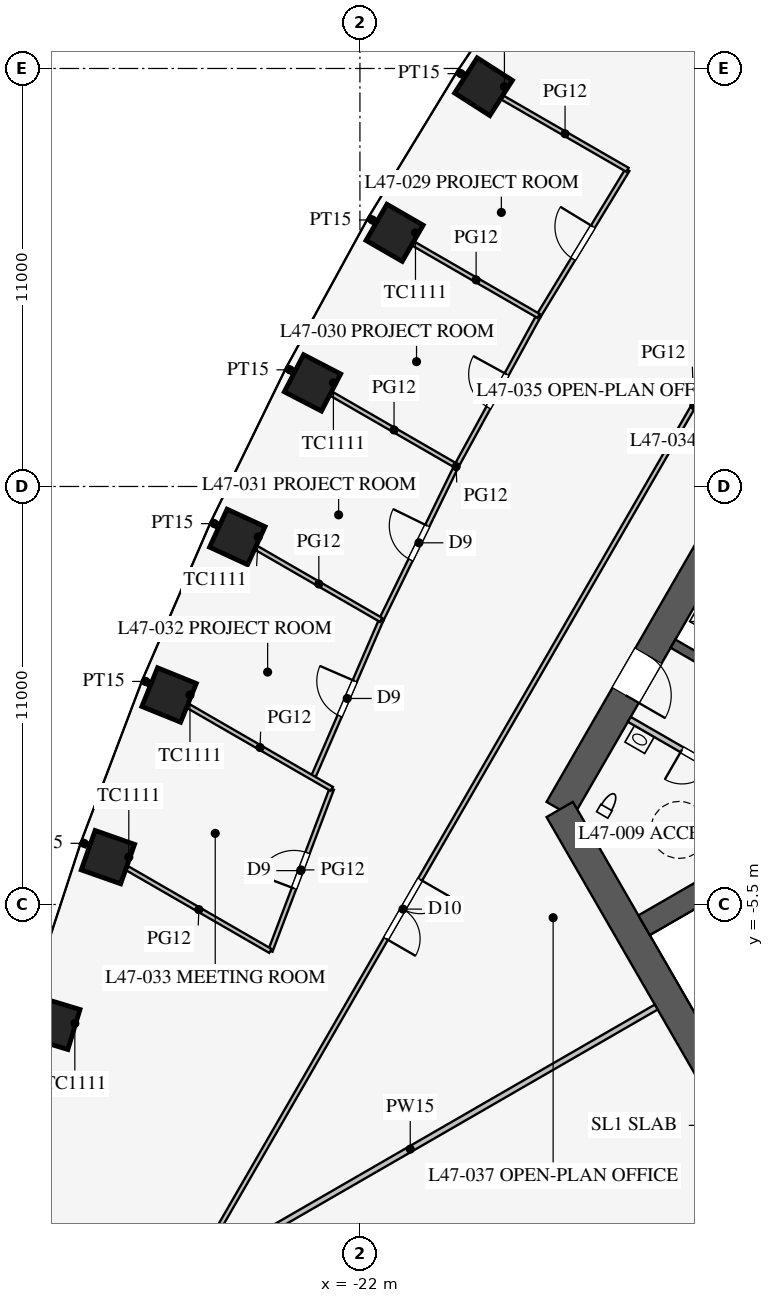
"""IFC4 building model, lengths in metres.
Left out: names, types, materials, properties, quantities, classifications, styles, units other than length and angle.
Written with IfcOpenShell. Run it as: python <this file> out.ifc"""

import sys

from ifc_helpers import new_model, si_unit, direction, frame, frame_2d, origin, origin_2d, place, context, subcontext, project, spatial, rectangle, extrude, element, fill, save


model = new_model("IFC4")
c1 = context("Model", 3, precision=1e-05, world=origin(), true_north=direction((0.0, 1.0)))
c2 = subcontext(c1, "Body", "Model", "MODEL_VIEW")
j1 = project(units=[si_unit("LENGTHUNIT", "METRE"), si_unit("PLANEANGLEUNIT", "RADIAN")], contexts=[c1])
p1 = place(None, origin())
s1 = spatial("IfcSite", under=j1, at=p1, CompositionType="ELEMENT")
p2 = place(p1, origin())
s2 = spatial("IfcBuilding", under=s1, at=p2, CompositionType="ELEMENT")
p3 = place(p2, frame((0.0, 0.0, 206.5)))
s3 = spatial("IfcBuildingStorey", under=s2, at=p3, CompositionType="ELEMENT", Elevation=206.5)
for number, where, z_axis, x_axis in (
    (1, (-18.748, 16.02, 0.0), (0.0, 0.0, 1.0), (-0.539, -0.842, 0.0)),
    (2, (-21.088, 12.175, 0.0), (0.0, 0.0, 1.0), (-0.5, -0.866, 0.0)),
    (3, (-23.248, 8.226, 0.0), (0.0, 0.0, 1.0), (-0.46, -0.888, 0.0)),
    (4, (-25.227, 4.172, 0.0), (0.0, 0.0, 1.0), (-0.418, -0.908, 0.0)),
    (5, (-27.022, 0.013, 0.0), (0.0, 0.0, 1.0), (-0.376, -0.927, 0.0)),
    (6, (-28.632, -4.254, 0.0), (0.0, 0.0, 1.0), (-0.332, -0.943, 0.0)),
    (7, (-30.052, -8.63, 0.0), (0.0, 0.0, 1.0), (-0.29, -0.957, 0.0)),
):
    element("IfcColumn", number, at=place(p3, frame(where, z_axis=z_axis, x_axis=x_axis)), inside=s3, PredefinedType="COLUMN", context=c2, shape_type="SweptSolid", body=[
        extrude(rectangle(XDim=1.1, YDim=1.1, at=origin_2d()), origin(), (0.0, 0.0, 1.0), 4.2),
    ])
p4 = place(p3, frame((-5.773, 16.0, 0.0), z_axis=(0.0, 0.0, 1.0), x_axis=(-0.500002442456, -0.866023993627, 0.0)))
e8 = element("IfcWall", 8, at=p4, inside=s3, PredefinedType="SHEAR", context=c2, shape_type="SweptSolid", body=[
    extrude(rectangle(XDim=21.939, YDim=0.8, at=frame_2d((10.97, 0.0))), origin(), (0.0, 0.0, 1.0), 4.2),
])
p5 = place(p4, frame((17.27, 0.0, 0.0)))
e9 = element("IfcOpeningElement", 9, at=p5, cuts=e8, PredefinedType="OPENING", context=c2, shape_type="SweptSolid", body=[
    extrude(rectangle(XDim=1.2, YDim=2.1, at=frame_2d((0.6, 1.05))), frame((0.0, 0.41, 0.0), z_axis=(0.0, -1.0, 0.0), x_axis=(1.0, 0.0, 0.0)), (0.0, 0.0, 1.0), 0.82),
])
p6 = place(p4, frame((3.47, 0.0, 0.0)))
e10 = element("IfcOpeningElement", 10, at=p6, cuts=e8, PredefinedType="OPENING", context=c2, shape_type="SweptSolid", body=[
    extrude(rectangle(XDim=1.2, YDim=2.1, at=frame_2d((0.6, 1.05))), frame((0.0, 0.41, 0.0), z_axis=(0.0, -1.0, 0.0), x_axis=(1.0, 0.0, 0.0)), (0.0, 0.0, 1.0), 0.82),
])
p7 = place(p3, frame((-16.743, -3.0, 0.0), z_axis=(0.0, 0.0, 1.0), x_axis=(0.499995765644, -0.866027848477, 0.0)))
e11 = element("IfcWall", 11, at=p7, inside=s3, PredefinedType="SHEAR", context=c2, shape_type="SweptSolid", body=[
    extrude(rectangle(XDim=11.547, YDim=0.8, at=frame_2d((5.773, 0.0))), origin(), (0.0, 0.0, 1.0), 4.2),
])
p8 = place(p3, frame((-11.532, 0.076, 0.0), z_axis=(0.0, 0.0, 1.0), x_axis=(-0.866005588531, 0.500034319456, 0.0)))
e12 = element("IfcWall", 12, at=p8, inside=s3, PredefinedType="SHEAR", context=c2, shape_type="SweptSolid", body=[
    extrude(rectangle(XDim=2.575, YDim=0.25, at=frame_2d((1.288, 0.0))), origin(), (0.0, 0.0, 1.0), 4.2),
])
p9 = place(p3, frame((-6.663, -1.509, 0.0), z_axis=(0.0, 0.0, 1.0), x_axis=(-0.866019375473, -0.500010441196, 0.0)))
e13 = element("IfcWall", 13, at=p9, inside=s3, PredefinedType="SHEAR", context=c2, shape_type="SweptSolid", body=[
    extrude(rectangle(XDim=9.075, YDim=0.6, at=frame_2d((4.538, 0.0))), origin(), (0.0, 0.0, 1.0), 4.2),
])
p10 = place(p3, frame((-10.495, -3.178, 0.0), z_axis=(0.0, 0.0, 1.0), x_axis=(-0.86602216432, 0.500005610874, 0.0)))
e14 = element("IfcWall", 14, at=p10, inside=s3, PredefinedType="PARTITIONING", context=c2, shape_type="SweptSolid", body=[
    extrude(rectangle(XDim=5.1, YDim=0.15, at=frame_2d((2.55, 0.0))), origin(), (0.0, 0.0, 1.0), 4.0),
])
p11 = place(p10, frame((2.6, 0.0, 0.0)))
e15 = element("IfcOpeningElement", 15, at=p11, cuts=e14, PredefinedType="OPENING", context=c2, shape_type="SweptSolid", body=[
    extrude(rectangle(XDim=0.9, YDim=2.1, at=frame_2d((0.45, 1.05))), frame((0.0, 0.085, 0.0), z_axis=(0.0, -1.0, 0.0), x_axis=(1.0, 0.0, 0.0)), (0.0, 0.0, 1.0), 0.17),
])
p12 = place(p3, frame((-14.203, -8.2, 0.0), z_axis=(0.0, 0.0, 1.0), x_axis=(-0.866021600284, -0.500006587798, 0.0)))
e16 = element("IfcWall", 16, at=p12, inside=s3, PredefinedType="PARTITIONING", context=c2, shape_type="SweptSolid", body=[
    extrude(rectangle(XDim=14.95, YDim=0.15, at=frame_2d((7.475, 0.0))), origin(), (0.0, 0.0, 1.0), 2.4),
])
p13 = place(p3, frame((-0.016, 30.491, 0.0), z_axis=(0.0, 0.0, 1.0), x_axis=(-0.50000091641, -0.866024874695, 0.0)))
e17 = element("IfcWall", 17, at=p13, inside=s3, PredefinedType="PARTITIONING", context=c2, shape_type="SweptSolid", body=[
    extrude(rectangle(XDim=52.796, YDim=0.12, at=frame_2d((26.398, 0.0))), origin(), (0.0, 0.0, 1.0), 2.9),
])
p14 = place(p13, frame((10.2, 0.0, 0.15)))
e18 = element("IfcOpeningElement", 18, at=p14, cuts=e17, PredefinedType="OPENING", context=c2, shape_type="SweptSolid", body=[
    extrude(rectangle(XDim=1.8, YDim=2.1, at=frame_2d((0.9, 1.05))), frame((0.0, 0.07, 0.0), z_axis=(0.0, -1.0, 0.0), x_axis=(1.0, 0.0, 0.0)), (0.0, 0.0, 1.0), 0.14),
])
p15 = place(p13, frame((40.8, 0.0, 0.15)))
e19 = element("IfcOpeningElement", 19, at=p15, cuts=e17, PredefinedType="OPENING", context=c2, shape_type="SweptSolid", body=[
    extrude(rectangle(XDim=1.8, YDim=2.1, at=frame_2d((0.9, 1.05))), frame((0.0, 0.07, 0.0), z_axis=(0.0, -1.0, 0.0), x_axis=(1.0, 0.0, 0.0)), (0.0, 0.0, 1.0), 0.14),
])
p16 = place(p3, frame((-21.568, 12.452, 0.0), z_axis=(0.0, 0.0, 1.0), x_axis=(-0.866303639744, 0.499517771221, 0.0)))
e20 = element("IfcWall", 20, at=p16, inside=s3, PredefinedType="PARTITIONING", context=c2, shape_type="SweptSolid", body=[
    extrude(rectangle(XDim=0.241, YDim=0.15, at=frame_2d((0.121, 0.0))), origin(), (0.0, 0.0, 1.0), 2.9),
])
p17 = place(p3, frame((-27.563, 0.325, 0.0), z_axis=(0.0, 0.0, 1.0), x_axis=(-0.865614066289, 0.500711781609, 0.0)))
e21 = element("IfcWall", 21, at=p17, inside=s3, PredefinedType="PARTITIONING", context=c2, shape_type="SweptSolid", body=[
    extrude(rectangle(XDim=0.178, YDim=0.15, at=frame_2d((0.089, 0.0))), origin(), (0.0, 0.0, 1.0), 2.9),
])
p18 = place(p3, frame((-29.191, -3.931, 0.0), z_axis=(0.0, 0.0, 1.0), x_axis=(-0.866484919499, 0.499203249469, 0.0)))
e22 = element("IfcWall", 22, at=p18, inside=s3, PredefinedType="PARTITIONING", context=c2, shape_type="SweptSolid", body=[
    extrude(rectangle(XDim=0.163, YDim=0.15, at=frame_2d((0.082, 0.0))), origin(), (0.0, 0.0, 1.0), 2.9),
])
p19 = place(p3, frame((-23.749, 8.515, 0.0), z_axis=(0.0, 0.0, 1.0), x_axis=(-0.865810949009, 0.500371262739, 0.0)))
e23 = element("IfcWall", 23, at=p19, inside=s3, PredefinedType="PARTITIONING", context=c2, shape_type="SweptSolid", body=[
    extrude(rectangle(XDim=0.217, YDim=0.15, at=frame_2d((0.108, 0.0))), origin(), (0.0, 0.0, 1.0), 2.9),
])
p20 = place(p3, frame((-25.748, 4.473, 0.0), z_axis=(0.0, 0.0, 1.0), x_axis=(-0.865625187776, 0.500692554656, 0.0)))
e24 = element("IfcWall", 24, at=p20, inside=s3, PredefinedType="PARTITIONING", context=c2, shape_type="SweptSolid", body=[
    extrude(rectangle(XDim=0.196, YDim=0.15, at=frame_2d((0.098, 0.0))), origin(), (0.0, 0.0, 1.0), 2.9),
])
p21 = place(p3, frame((-19.249, 16.31, 0.0), z_axis=(0.0, 0.0, 1.0), x_axis=(-0.865810949009, 0.500371262739, 0.0)))
e25 = element("IfcWall", 25, at=p21, inside=s3, PredefinedType="PARTITIONING", context=c2, shape_type="SweptSolid", body=[
    extrude(rectangle(XDim=0.217, YDim=0.15, at=frame_2d((0.108, 0.0))), origin(), (0.0, 0.0, 1.0), 2.9),
])
p22 = place(p3, frame((-17.299, 9.988, 0.0), z_axis=(0.0, 0.0, 1.0), x_axis=(-0.480014565702, -0.877260518155, 0.0)))
e26 = element("IfcWall", 26, at=p22, inside=s3, PredefinedType="PARTITIONING", context=c2, shape_type="SweptSolid", body=[
    extrude(rectangle(XDim=4.501, YDim=0.12, at=frame_2d((2.25, 0.0))), origin(), (0.0, 0.0, 1.0), 2.9),
])
p23 = place(p22, frame((1.75, 0.0, 0.15)))
e27 = element("IfcOpeningElement", 27, at=p23, cuts=e26, PredefinedType="OPENING", context=c2, shape_type="SweptSolid", body=[
    extrude(rectangle(XDim=1.0, YDim=2.1, at=frame_2d((0.5, 1.05))), frame((0.0, 0.07, 0.0), z_axis=(0.0, -1.0, 0.0), x_axis=(1.0, 0.0, 0.0)), (0.0, 0.0, 1.0), 0.14),
])
p24 = place(p3, frame((-22.742, -2.458, 0.0), z_axis=(0.0, 0.0, 1.0), x_axis=(-0.354219967303, -0.935162132875, 0.0)))
e28 = element("IfcWall", 28, at=p24, inside=s3, PredefinedType="PARTITIONING", context=c2, shape_type="SweptSolid", body=[
    extrude(rectangle(XDim=4.559, YDim=0.12, at=frame_2d((2.28, 0.0))), origin(), (0.0, 0.0, 1.0), 2.9),
])
p25 = place(p24, frame((1.8, 0.0, 0.15)))
e29 = element("IfcOpeningElement", 29, at=p25, cuts=e28, PredefinedType="OPENING", context=c2, shape_type="SweptSolid", body=[
    extrude(rectangle(XDim=1.0, YDim=2.1, at=frame_2d((0.5, 1.05))), frame((0.0, 0.07, 0.0), z_axis=(0.0, -1.0, 0.0), x_axis=(1.0, 0.0, 0.0)), (0.0, 0.0, 1.0), 0.14),
])
p26 = place(p3, frame((-19.46, 6.039, 0.0), z_axis=(0.0, 0.0, 1.0), x_axis=(-0.43911984878, -0.898428493764, 0.0)))
e30 = element("IfcWall", 30, at=p26, inside=s3, PredefinedType="PARTITIONING", context=c2, shape_type="SweptSolid", body=[
    extrude(rectangle(XDim=4.511, YDim=0.12, at=frame_2d((2.255, 0.0))), origin(), (0.0, 0.0, 1.0), 2.9),
])
p27 = place(p26, frame((1.75, 0.0, 0.15)))
e31 = element("IfcOpeningElement", 31, at=p27, cuts=e30, PredefinedType="OPENING", context=c2, shape_type="SweptSolid", body=[
    extrude(rectangle(XDim=1.0, YDim=2.1, at=frame_2d((0.5, 1.05))), frame((0.0, 0.07, 0.0), z_axis=(0.0, -1.0, 0.0), x_axis=(1.0, 0.0, 0.0)), (0.0, 0.0, 1.0), 0.14),
])
p28 = place(p3, frame((-21.441, 1.987, 0.0), z_axis=(0.0, 0.0, 1.0), x_axis=(-0.397188455592, -0.917737070595, 0.0)))
e32 = element("IfcWall", 32, at=p28, inside=s3, PredefinedType="PARTITIONING", context=c2, shape_type="SweptSolid", body=[
    extrude(rectangle(XDim=4.53, YDim=0.12, at=frame_2d((2.265, 0.0))), origin(), (0.0, 0.0, 1.0), 2.9),
])
p29 = place(p28, frame((1.75, 0.0, 0.15)))
e33 = element("IfcOpeningElement", 33, at=p29, cuts=e32, PredefinedType="OPENING", context=c2, shape_type="SweptSolid", body=[
    extrude(rectangle(XDim=1.0, YDim=2.1, at=frame_2d((0.5, 1.05))), frame((0.0, 0.07, 0.0), z_axis=(0.0, -1.0, 0.0), x_axis=(1.0, 0.0, 0.0)), (0.0, 0.0, 1.0), 0.14),
])
p30 = place(p3, frame((-14.96, 13.833, 0.0), z_axis=(0.0, 0.0, 1.0), x_axis=(-0.519726678229, -0.854332593278, 0.0)))
e34 = element("IfcWall", 34, at=p30, inside=s3, PredefinedType="PARTITIONING", context=c2, shape_type="SweptSolid", body=[
    extrude(rectangle(XDim=4.501, YDim=0.12, at=frame_2d((2.25, 0.0))), origin(), (0.0, 0.0, 1.0), 2.9),
])
p31 = place(p30, frame((1.75, 0.0, 0.15)))
e35 = element("IfcOpeningElement", 35, at=p31, cuts=e34, PredefinedType="OPENING", context=c2, shape_type="SweptSolid", body=[
    extrude(rectangle(XDim=1.0, YDim=2.1, at=frame_2d((0.5, 1.05))), frame((0.0, 0.07, 0.0), z_axis=(0.0, -1.0, 0.0), x_axis=(1.0, 0.0, 0.0)), (0.0, 0.0, 1.0), 0.14),
])
p32 = place(p3, frame((-17.299, 9.988, 0.0), z_axis=(0.0, 0.0, 1.0), x_axis=(-0.866033463206, 0.499986040413, 0.0)))
e36 = element("IfcWall", 36, at=p32, inside=s3, PredefinedType="PARTITIONING", context=c2, shape_type="SweptSolid", body=[
    extrude(rectangle(XDim=3.795, YDim=0.12, at=frame_2d((1.897, 0.0))), origin(), (0.0, 0.0, 1.0), 2.9),
])
p33 = place(p3, frame((-22.742, -2.458, 0.0), z_axis=(0.0, 0.0, 1.0), x_axis=(-0.866034407719, 0.499984404404, 0.0)))
e37 = element("IfcWall", 37, at=p33, inside=s3, PredefinedType="PARTITIONING", context=c2, shape_type="SweptSolid", body=[
    extrude(rectangle(XDim=4.357, YDim=0.12, at=frame_2d((2.178, 0.0))), origin(), (0.0, 0.0, 1.0), 2.9),
])
p34 = place(p3, frame((-24.357, -6.722, 0.0), z_axis=(0.0, 0.0, 1.0), x_axis=(-0.866025625133, 0.499999616612, 0.0)))
e38 = element("IfcWall", 38, at=p34, inside=s3, PredefinedType="PARTITIONING", context=c2, shape_type="SweptSolid", body=[
    extrude(rectangle(XDim=4.346, YDim=0.12, at=frame_2d((2.173, 0.0))), origin(), (0.0, 0.0, 1.0), 2.9),
])
p35 = place(p3, frame((-19.46, 6.039, 0.0), z_axis=(0.0, 0.0, 1.0), x_axis=(-0.866020532957, 0.500008436426, 0.0)))
e39 = element("IfcWall", 39, at=p35, inside=s3, PredefinedType="PARTITIONING", context=c2, shape_type="SweptSolid", body=[
    extrude(rectangle(XDim=3.793, YDim=0.12, at=frame_2d((1.897, 0.0))), origin(), (0.0, 0.0, 1.0), 2.9),
])
p36 = place(p3, frame((-21.441, 1.987, 0.0), z_axis=(0.0, 0.0, 1.0), x_axis=(-0.866030006337, 0.499992028061, 0.0)))
e40 = element("IfcWall", 40, at=p36, inside=s3, PredefinedType="PARTITIONING", context=c2, shape_type="SweptSolid", body=[
    extrude(rectangle(XDim=3.789, YDim=0.12, at=frame_2d((1.895, 0.0))), origin(), (0.0, 0.0, 1.0), 2.9),
])
p37 = place(p3, frame((-14.96, 13.833, 0.0), z_axis=(0.0, 0.0, 1.0), x_axis=(-0.866020532957, 0.500008436426, 0.0)))
e41 = element("IfcWall", 41, at=p37, inside=s3, PredefinedType="PARTITIONING", context=c2, shape_type="SweptSolid", body=[
    extrude(rectangle(XDim=3.793, YDim=0.12, at=frame_2d((1.897, 0.0))), origin(), (0.0, 0.0, 1.0), 2.9),
])
p38 = place(p11, origin())
e42 = element("IfcDoor", 42, at=p38, inside=s3, OperationType="SINGLE_SWING_RIGHT", PredefinedType="DOOR", context=c2, shape_type="SweptSolid", body=[
    extrude(rectangle(XDim=0.9, YDim=2.1, at=frame_2d((0.45, 1.05))), frame((0.0, 0.025, 0.0), z_axis=(0.0, -1.0, 0.0), x_axis=(1.0, 0.0, 0.0)), (0.0, 0.0, 1.0), 0.05),
])
fill(e15, e42)
p39 = place(p5, origin())
e43 = element("IfcDoor", 43, at=p39, inside=s3, OperationType="SINGLE_SWING_RIGHT", PredefinedType="DOOR", context=c2, shape_type="SweptSolid", body=[
    extrude(rectangle(XDim=1.2, YDim=2.1, at=frame_2d((0.6, 1.05))), frame((0.0, 0.025, 0.0), z_axis=(0.0, -1.0, 0.0), x_axis=(1.0, 0.0, 0.0)), (0.0, 0.0, 1.0), 0.05),
])
fill(e9, e43)
p40 = place(p31, frame((1.0, 0.0, 0.0), z_axis=(0.0, 0.0, 1.0), x_axis=(-1.0, 0.0, 0.0)))
e44 = element("IfcDoor", 44, at=p40, inside=s3, OperationType="SINGLE_SWING_RIGHT", PredefinedType="DOOR", context=c2, shape_type="SweptSolid", body=[
    extrude(rectangle(XDim=1.0, YDim=2.1, at=frame_2d((0.5, 1.05))), frame((0.0, 0.025, 0.0), z_axis=(0.0, -1.0, 0.0), x_axis=(1.0, 0.0, 0.0)), (0.0, 0.0, 1.0), 0.05),
])
fill(e35, e44)
p41 = place(p23, frame((1.0, 0.0, 0.0), z_axis=(0.0, 0.0, 1.0), x_axis=(-1.0, 0.0, 0.0)))
e45 = element("IfcDoor", 45, at=p41, inside=s3, OperationType="SINGLE_SWING_RIGHT", PredefinedType="DOOR", context=c2, shape_type="SweptSolid", body=[
    extrude(rectangle(XDim=1.0, YDim=2.1, at=frame_2d((0.5, 1.05))), frame((0.0, 0.025, 0.0), z_axis=(0.0, -1.0, 0.0), x_axis=(1.0, 0.0, 0.0)), (0.0, 0.0, 1.0), 0.05),
])
fill(e27, e45)
p42 = place(p27, frame((1.0, 0.0, 0.0), z_axis=(0.0, 0.0, 1.0), x_axis=(-1.0, 0.0, 0.0)))
e46 = element("IfcDoor", 46, at=p42, inside=s3, OperationType="SINGLE_SWING_RIGHT", PredefinedType="DOOR", context=c2, shape_type="SweptSolid", body=[
    extrude(rectangle(XDim=1.0, YDim=2.1, at=frame_2d((0.5, 1.05))), frame((0.0, 0.025, 0.0), z_axis=(0.0, -1.0, 0.0), x_axis=(1.0, 0.0, 0.0)), (0.0, 0.0, 1.0), 0.05),
])
fill(e31, e46)
p43 = place(p29, frame((1.0, 0.0, 0.0), z_axis=(0.0, 0.0, 1.0), x_axis=(-1.0, 0.0, 0.0)))
e47 = element("IfcDoor", 47, at=p43, inside=s3, OperationType="SINGLE_SWING_RIGHT", PredefinedType="DOOR", context=c2, shape_type="SweptSolid", body=[
    extrude(rectangle(XDim=1.0, YDim=2.1, at=frame_2d((0.5, 1.05))), frame((0.0, 0.025, 0.0), z_axis=(0.0, -1.0, 0.0), x_axis=(1.0, 0.0, 0.0)), (0.0, 0.0, 1.0), 0.05),
])
fill(e33, e47)
p44 = place(p25, frame((1.0, 0.0, 0.0), z_axis=(0.0, 0.0, 1.0), x_axis=(-1.0, 0.0, 0.0)))
e48 = element("IfcDoor", 48, at=p44, inside=s3, OperationType="SINGLE_SWING_LEFT", PredefinedType="DOOR", context=c2, shape_type="SweptSolid", body=[
    extrude(rectangle(XDim=1.0, YDim=2.1, at=frame_2d((0.5, 1.05))), frame((0.0, 0.025, 0.0), z_axis=(0.0, -1.0, 0.0), x_axis=(1.0, 0.0, 0.0)), (0.0, 0.0, 1.0), 0.05),
])
fill(e29, e48)
p45 = place(p15, origin())
e49 = element("IfcDoor", 49, at=p45, inside=s3, OperationType="DOUBLE_DOOR_SINGLE_SWING", PredefinedType="DOOR", context=c2, shape_type="SweptSolid", body=[
    extrude(rectangle(XDim=1.8, YDim=2.1, at=frame_2d((0.9, 1.05))), frame((0.0, 0.025, 0.0), z_axis=(0.0, -1.0, 0.0), x_axis=(1.0, 0.0, 0.0)), (0.0, 0.0, 1.0), 0.05),
])
fill(e19, e49)
save(model, sys.argv[1])
